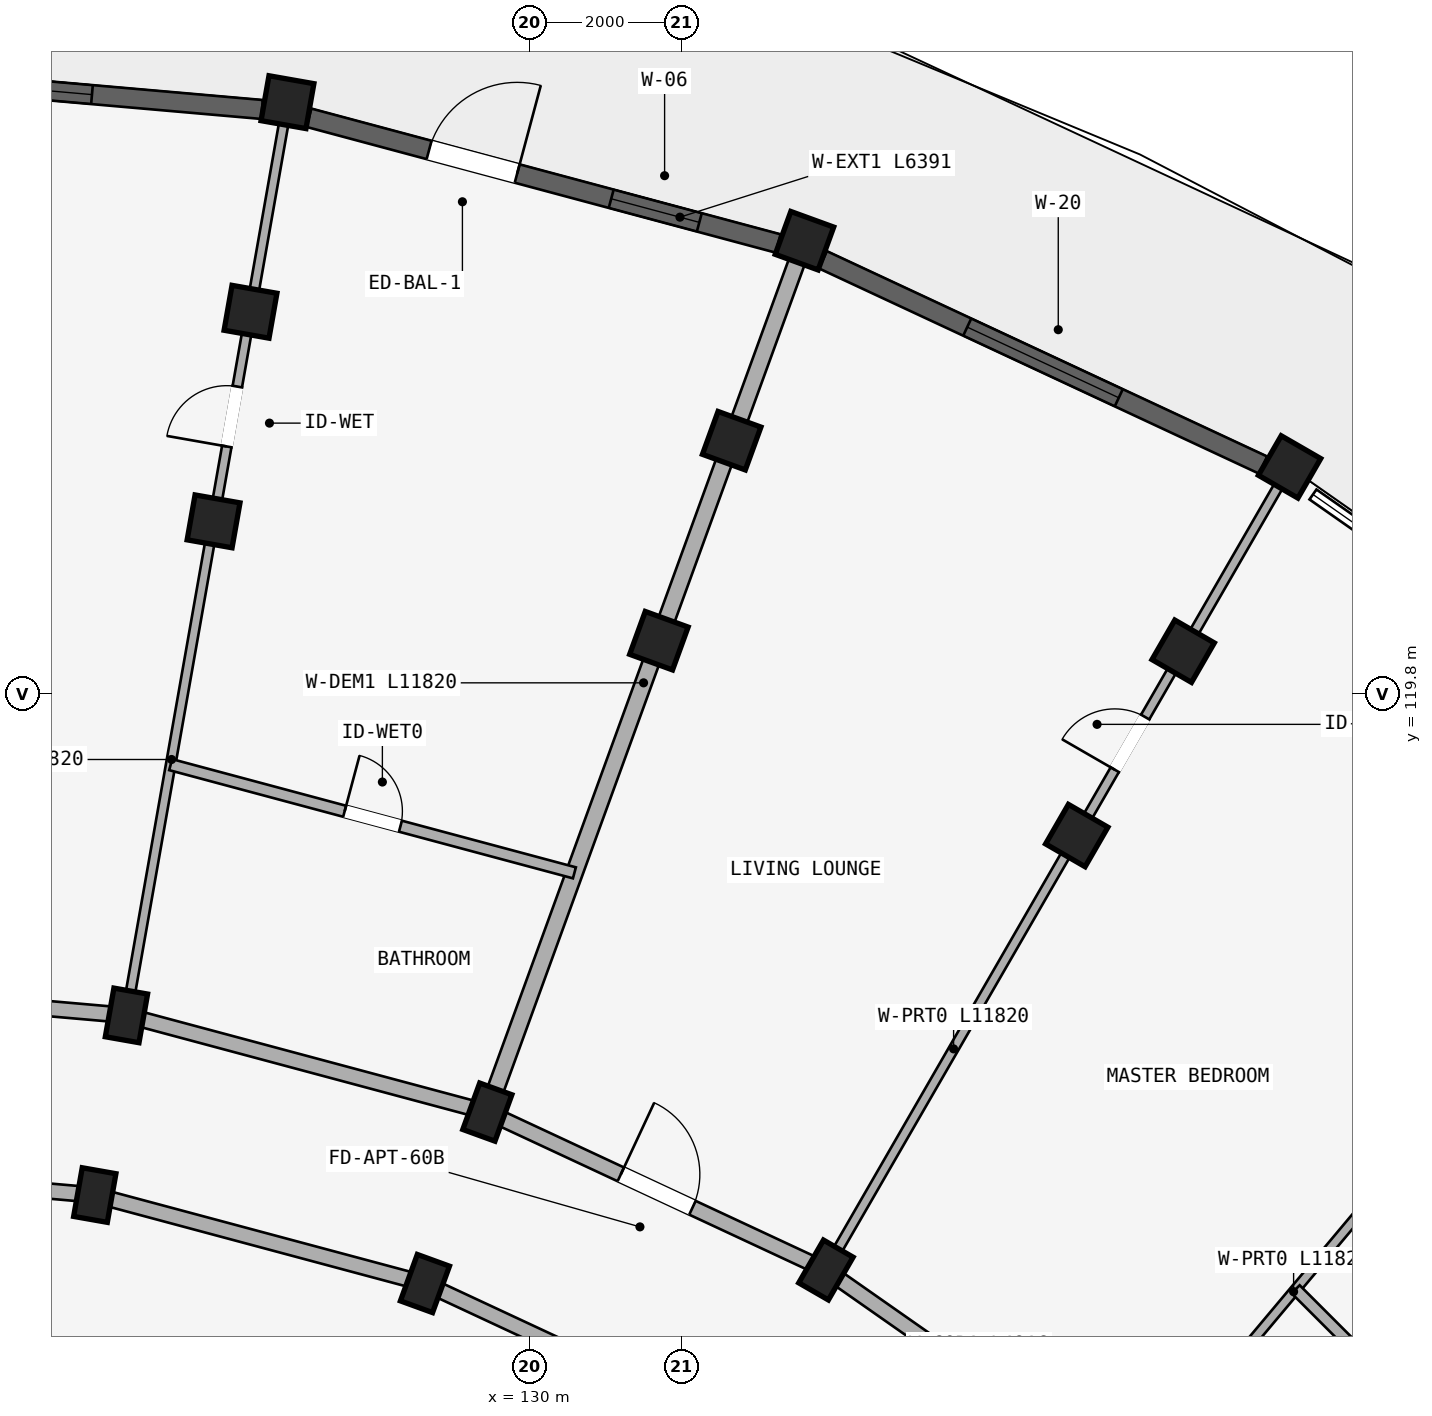
"""IFC4 building model, lengths in metres.
Left out: names, types, materials, properties, quantities, classifications, styles, units other than length and angle.
Written with IfcOpenShell. Run it as: python <this file> out.ifc"""

import sys

from ifc_helpers import new_model, si_unit, direction, frame, frame_2d, origin, origin_2d, place, context, subcontext, project, spatial, rectangle, extrude, element, fill, save


model = new_model("IFC4")
c1 = context("Model", 3, precision=1e-05, world=origin(), true_north=direction((0.0, 1.0)))
c2 = subcontext(c1, "Body", "Model", "MODEL_VIEW")
j1 = project(units=[si_unit("LENGTHUNIT", "METRE"), si_unit("PLANEANGLEUNIT", "RADIAN")], contexts=[c1])
p1 = place(None, origin())
s1 = spatial("IfcSite", under=j1, at=p1, CompositionType="ELEMENT")
p2 = place(p1, origin())
s2 = spatial("IfcBuilding", under=s1, at=p2, CompositionType="ELEMENT")
p3 = place(p2, frame((0.0, 0.0, 33.9)))
s3 = spatial("IfcBuildingStorey", under=s2, at=p3, CompositionType="ELEMENT", Elevation=33.9)
for number, where, z_axis, x_axis in (
    (1, (124.28, 113.208, 0.0), (0.0, 0.0, 1.0), (-0.985, 0.174, 0.0)),
    (2, (124.697, 115.572, 0.0), (0.0, 0.0, 1.0), (-0.985, 0.174, 0.0)),
):
    element("IfcColumn", number, at=place(p3, frame(where, z_axis=z_axis, x_axis=x_axis)), inside=s3, PredefinedType="COLUMN", context=c2, shape_type="SweptSolid", body=[
        extrude(rectangle(XDim=0.45, YDim=0.65, at=origin_2d()), origin(), (0.0, 0.0, 1.0), 2.93),
    ])
for number, where, z_axis, x_axis in (
    (3, (125.843, 122.071, 0.0), (0.0, 0.0, 1.0), (-0.985, 0.174, 0.0)),
    (4, (126.329, 124.829, 0.0), (0.0, 0.0, 1.0), (-0.985, 0.174, 0.0)),
):
    element("IfcColumn", number, at=place(p3, frame(where, z_axis=z_axis, x_axis=x_axis)), inside=s3, PredefinedType="COLUMN", context=c2, shape_type="SweptSolid", body=[
        extrude(rectangle(XDim=0.6, YDim=0.6, at=origin_2d()), origin(), (0.0, 0.0, 1.0), 2.93),
    ])
p4 = place(p3, frame((126.815, 127.586, 0.0), z_axis=(0.0, 0.0, 1.0), x_axis=(-0.984807753012, 0.173648177667, 0.0)))
e5 = element("IfcColumn", 5, at=p4, inside=s3, PredefinedType="COLUMN", context=c2, shape_type="SweptSolid", body=[
    extrude(rectangle(XDim=0.6, YDim=0.6, at=origin_2d()), origin(), (0.0, 0.0, 1.0), 2.97),
])
for number, where, z_axis, x_axis in (
    (6, (128.624, 112.044, 0.0), (0.0, 0.0, 1.0), (-0.94, 0.342, 0.0)),
    (7, (129.445, 114.299, 0.0), (0.0, 0.0, 1.0), (-0.94, 0.342, 0.0)),
):
    element("IfcColumn", number, at=place(p3, frame(where, z_axis=z_axis, x_axis=x_axis)), inside=s3, PredefinedType="COLUMN", context=c2, shape_type="SweptSolid", body=[
        extrude(rectangle(XDim=0.45, YDim=0.65, at=origin_2d()), origin(), (0.0, 0.0, 1.0), 2.93),
    ])
for number, where, z_axis, x_axis in (
    (8, (131.702, 120.501, 0.0), (0.0, 0.0, 1.0), (-0.94, 0.342, 0.0)),
    (9, (132.66, 123.132, 0.0), (0.0, 0.0, 1.0), (-0.94, 0.342, 0.0)),
):
    element("IfcColumn", number, at=place(p3, frame(where, z_axis=z_axis, x_axis=x_axis)), inside=s3, PredefinedType="COLUMN", context=c2, shape_type="SweptSolid", body=[
        extrude(rectangle(XDim=0.6, YDim=0.6, at=origin_2d()), origin(), (0.0, 0.0, 1.0), 2.93),
    ])
p5 = place(p3, frame((133.618, 125.764, 0.0), z_axis=(0.0, 0.0, 1.0), x_axis=(-0.939692620786, 0.342020143326, 0.0)))
e10 = element("IfcColumn", 10, at=p5, inside=s3, PredefinedType="COLUMN", context=c2, shape_type="SweptSolid", body=[
    extrude(rectangle(XDim=0.6, YDim=0.6, at=origin_2d()), origin(), (0.0, 0.0, 1.0), 2.97),
])
p6 = place(p3, frame((133.9, 112.222, 0.0), z_axis=(0.0, 0.0, 1.0), x_axis=(-0.866025403784, 0.5, 0.0)))
e11 = element("IfcColumn", 11, at=p6, inside=s3, PredefinedType="COLUMN", context=c2, shape_type="SweptSolid", body=[
    extrude(rectangle(XDim=0.45, YDim=0.65, at=origin_2d()), origin(), (0.0, 0.0, 1.0), 2.93),
])
for number, where, z_axis, x_axis in (
    (12, (137.2, 117.938, 0.0), (0.0, 0.0, 1.0), (-0.866, 0.5, 0.0)),
    (13, (138.6, 120.363, 0.0), (0.0, 0.0, 1.0), (-0.866, 0.5, 0.0)),
):
    element("IfcColumn", number, at=place(p3, frame(where, z_axis=z_axis, x_axis=x_axis)), inside=s3, PredefinedType="COLUMN", context=c2, shape_type="SweptSolid", body=[
        extrude(rectangle(XDim=0.6, YDim=0.6, at=origin_2d()), origin(), (0.0, 0.0, 1.0), 2.93),
    ])
p7 = place(p3, frame((140.0, 122.787, 0.0), z_axis=(0.0, 0.0, 1.0), x_axis=(-0.866025403784, 0.5, 0.0)))
e14 = element("IfcColumn", 14, at=p7, inside=s3, PredefinedType="COLUMN", context=c2, shape_type="SweptSolid", body=[
    extrude(rectangle(XDim=0.6, YDim=0.6, at=origin_2d()), origin(), (0.0, 0.0, 1.0), 2.97),
])
p8 = place(p3, frame((119.8, 113.6, 0.0), z_axis=(0.0, 0.0, 1.0), x_axis=(0.996191949488, -0.087187153726, 0.0)))
e15 = element("IfcWall", 15, at=p8, inside=s3, PredefinedType="STANDARD", context=c2, shape_type="SweptSolid", body=[
    extrude(rectangle(XDim=4.497, YDim=0.2, at=frame_2d((2.249, 0.0))), origin(), (0.0, 0.0, 1.0), 2.372),
])
p9 = place(p8, frame((1.729, 0.0, 0.0)))
e16 = element("IfcOpeningElement", 16, at=p9, cuts=e15, PredefinedType="OPENING", context=c2, shape_type="SweptSolid", body=[
    extrude(rectangle(XDim=1.04, YDim=2.15, at=frame_2d((0.52, 1.075))), frame((0.0, 0.11, 0.0), z_axis=(0.0, -1.0, 0.0), x_axis=(1.0, 0.0, 0.0)), (0.0, 0.0, 1.0), 0.22),
])
p10 = place(p3, frame((119.8, 116.0, 0.0), z_axis=(0.0, 0.0, 1.0), x_axis=(0.996193663584, -0.087167566415, 0.0)))
e17 = element("IfcWall", 17, at=p10, inside=s3, PredefinedType="STANDARD", context=c2, shape_type="SweptSolid", body=[
    extrude(rectangle(XDim=4.916, YDim=0.2, at=frame_2d((2.458, 0.0))), origin(), (0.0, 0.0, 1.0), 2.372),
])
p11 = place(p10, frame((1.958, 0.0, 0.0)))
e18 = element("IfcOpeningElement", 18, at=p11, cuts=e17, PredefinedType="OPENING", context=c2, shape_type="SweptSolid", body=[
    extrude(rectangle(XDim=1.0, YDim=2.15, at=frame_2d((0.5, 1.075))), frame((0.0, 0.11, 0.0), z_axis=(0.0, -1.0, 0.0), x_axis=(1.0, 0.0, 0.0)), (0.0, 0.0, 1.0), 0.22),
])
p12 = place(p3, frame((124.28, 113.208, 0.0), z_axis=(0.0, 0.0, 1.0), x_axis=(0.965934240054, -0.258787642463, 0.0)))
e19 = element("IfcWall", 19, at=p12, inside=s3, PredefinedType="STANDARD", context=c2, shape_type="SweptSolid", body=[
    extrude(rectangle(XDim=4.497, YDim=0.2, at=frame_2d((2.249, 0.0))), origin(), (0.0, 0.0, 1.0), 2.372),
])
p13 = place(p3, frame((124.697, 115.572, 0.0), z_axis=(0.0, 0.0, 1.0), x_axis=(0.965930095386, -0.258803112091, 0.0)))
e20 = element("IfcWall", 20, at=p13, inside=s3, PredefinedType="STANDARD", context=c2, shape_type="SweptSolid", body=[
    extrude(rectangle(XDim=4.916, YDim=0.2, at=frame_2d((2.458, 0.0))), origin(), (0.0, 0.0, 1.0), 2.372),
])
p14 = place(p3, frame((128.624, 112.044, 0.0), z_axis=(0.0, 0.0, 1.0), x_axis=(0.906307919131, -0.422617978463, 0.0)))
e21 = element("IfcWall", 21, at=p14, inside=s3, PredefinedType="STANDARD", context=c2, shape_type="SweptSolid", body=[
    extrude(rectangle(XDim=4.497, YDim=0.2, at=frame_2d((2.249, 0.0))), origin(), (0.0, 0.0, 1.0), 2.372),
])
p15 = place(p3, frame((129.445, 114.299, 0.0), z_axis=(0.0, 0.0, 1.0), x_axis=(0.906302381024, -0.422629854778, 0.0)))
e22 = element("IfcWall", 22, at=p15, inside=s3, PredefinedType="STANDARD", context=c2, shape_type="SweptSolid", body=[
    extrude(rectangle(XDim=4.915, YDim=0.2, at=frame_2d((2.458, 0.0))), origin(), (0.0, 0.0, 1.0), 2.372),
])
p16 = place(p15, frame((1.938, 0.0, 0.0)))
e23 = element("IfcOpeningElement", 23, at=p16, cuts=e22, PredefinedType="OPENING", context=c2, shape_type="SweptSolid", body=[
    extrude(rectangle(XDim=1.04, YDim=2.15, at=frame_2d((0.52, 1.075))), frame((0.0, 0.11, 0.0), z_axis=(0.0, -1.0, 0.0), x_axis=(1.0, 0.0, 0.0)), (0.0, 0.0, 1.0), 0.22),
])
p17 = place(p3, frame((133.9, 112.222, 0.0), z_axis=(0.0, 0.0, 1.0), x_axis=(0.819140911474, -0.573592335331, 0.0)))
e24 = element("IfcWall", 24, at=p17, inside=s3, PredefinedType="STANDARD", context=c2, shape_type="SweptSolid", body=[
    extrude(rectangle(XDim=4.916, YDim=0.2, at=frame_2d((2.458, 0.0))), origin(), (0.0, 0.0, 1.0), 2.372),
])
p18 = place(p3, frame((124.714, 115.67, 0.0), z_axis=(0.0, 0.0, 1.0), x_axis=(0.173646292378, 0.984808085438, 0.0)))
e25 = element("IfcWall", 25, at=p18, inside=s3, PredefinedType="PARTITIONING", context=c2, shape_type="SweptSolid", body=[
    extrude(rectangle(XDim=11.82, YDim=0.125, at=frame_2d((5.91, 0.0))), origin(), (0.0, 0.0, 1.0), 2.372),
])
p19 = place(p18, frame((7.5, 0.0, 0.0)))
e26 = element("IfcOpeningElement", 26, at=p19, cuts=e25, PredefinedType="OPENING", context=c2, shape_type="SweptSolid", body=[
    extrude(rectangle(XDim=0.8, YDim=2.1, at=frame_2d((0.4, 1.05))), frame((0.0, 0.073, 0.0), z_axis=(0.0, -1.0, 0.0), x_axis=(1.0, 0.0, 0.0)), (0.0, 0.0, 1.0), 0.145),
])
p20 = place(p3, frame((129.479, 114.393, 0.0), z_axis=(0.0, 0.0, 1.0), x_axis=(0.342005081534, 0.939698102693, 0.0)))
e27 = element("IfcWall", 27, at=p20, inside=s3, PredefinedType="STANDARD", context=c2, shape_type="SweptSolid", body=[
    extrude(rectangle(XDim=11.82, YDim=0.22, at=frame_2d((5.91, 0.0))), origin(), (0.0, 0.0, 1.0), 2.372),
])
p21 = place(p3, frame((133.95, 112.309, 0.0), z_axis=(0.0, 0.0, 1.0), x_axis=(0.500013290014, 0.866017730655, 0.0)))
e28 = element("IfcWall", 28, at=p21, inside=s3, PredefinedType="PARTITIONING", context=c2, shape_type="SweptSolid", body=[
    extrude(rectangle(XDim=11.82, YDim=0.125, at=frame_2d((5.91, 0.0))), origin(), (0.0, 0.0, 1.0), 2.372),
])
p22 = place(p21, frame((7.5, 0.0, 0.0)))
e29 = element("IfcOpeningElement", 29, at=p22, cuts=e28, PredefinedType="OPENING", context=c2, shape_type="SweptSolid", body=[
    extrude(rectangle(XDim=0.8, YDim=2.1, at=frame_2d((0.4, 1.05))), frame((0.0, 0.073, 0.0), z_axis=(0.0, -1.0, 0.0), x_axis=(1.0, 0.0, 0.0)), (0.0, 0.0, 1.0), 0.145),
])
p23 = place(p3, frame((137.991, 109.479, 0.0), z_axis=(0.0, 0.0, 1.0), x_axis=(0.642781220531, 0.766049804211, 0.0)))
e30 = element("IfcWall", 30, at=p23, inside=s3, PredefinedType="PARTITIONING", context=c2, shape_type="SweptSolid", body=[
    extrude(rectangle(XDim=11.82, YDim=0.125, at=frame_2d((5.91, 0.0))), origin(), (0.0, 0.0, 1.0), 2.372),
])
p24 = place(p23, frame((7.5, 0.0, 0.0)))
e31 = element("IfcOpeningElement", 31, at=p24, cuts=e30, PredefinedType="OPENING", context=c2, shape_type="SweptSolid", body=[
    extrude(rectangle(XDim=0.8, YDim=2.1, at=frame_2d((0.4, 1.05))), frame((0.0, 0.073, 0.0), z_axis=(0.0, -1.0, 0.0), x_axis=(1.0, 0.0, 0.0)), (0.0, 0.0, 1.0), 0.145),
])
p25 = place(p3, frame((125.279, 118.871, 0.0), z_axis=(0.0, 0.0, 1.0), x_axis=(0.965929227513, -0.258806351229, 0.0)))
e32 = element("IfcWall", 32, at=p25, inside=s3, PredefinedType="PLUMBINGWALL", context=c2, shape_type="SweptSolid", body=[
    extrude(rectangle(XDim=5.5, YDim=0.15, at=frame_2d((2.75, 0.0))), origin(), (0.0, 0.0, 1.0), 2.372),
])
p26 = place(p25, frame((2.37, 0.0, 0.0)))
e33 = element("IfcOpeningElement", 33, at=p26, cuts=e32, PredefinedType="OPENING", context=c2, shape_type="SweptSolid", body=[
    extrude(rectangle(XDim=0.76, YDim=2.05, at=frame_2d((0.38, 1.025))), frame((0.0, 0.085, 0.0), z_axis=(0.0, -1.0, 0.0), x_axis=(1.0, 0.0, 0.0)), (0.0, 0.0, 1.0), 0.17),
])
p27 = place(p3, frame((140.08, 111.969, 0.0), z_axis=(0.0, 0.0, 1.0), x_axis=(0.707106781187, -0.707106781187, 0.0)))
e34 = element("IfcWall", 34, at=p27, inside=s3, PredefinedType="PLUMBINGWALL", context=c2, shape_type="SweptSolid", body=[
    extrude(rectangle(XDim=5.5, YDim=0.15, at=frame_2d((2.75, 0.0))), origin(), (0.0, 0.0, 1.0), 2.372),
])
p28 = place(p27, frame((2.37, 0.0, 0.0)))
e35 = element("IfcOpeningElement", 35, at=p28, cuts=e34, PredefinedType="OPENING", context=c2, shape_type="SweptSolid", body=[
    extrude(rectangle(XDim=0.76, YDim=2.05, at=frame_2d((0.38, 1.025))), frame((0.0, 0.085, 0.0), z_axis=(0.0, -1.0, 0.0), x_axis=(1.0, 0.0, 0.0)), (0.0, 0.0, 1.0), 0.17),
])
p29 = place(p3, frame((120.114, 128.047, 0.0), z_axis=(0.0, 0.0, 1.0), x_axis=(0.996192846662, -0.087176902101, 0.0)))
e36 = element("IfcWall", 36, at=p29, inside=s3, PredefinedType="STANDARD", context=c2, shape_type="SweptSolid", body=[
    extrude(rectangle(XDim=6.391, YDim=0.25, at=frame_2d((3.195, 0.0))), origin(), (0.0, 0.0, 1.0), 2.48),
])
p30 = place(p29, frame((2.245, 0.0, 0.53)))
e37 = element("IfcOpeningElement", 37, at=p30, cuts=e36, PredefinedType="OPENING", context=c2, shape_type="SweptSolid", body=[
    extrude(rectangle(XDim=1.9, YDim=1.75, at=frame_2d((0.95, 0.875))), frame((0.0, 0.135, 0.0), z_axis=(0.0, -1.0, 0.0), x_axis=(1.0, 0.0, 0.0)), (0.0, 0.0, 1.0), 0.27),
])
p31 = place(p3, frame((127.098, 127.381, 0.0), z_axis=(0.0, 0.0, 1.0), x_axis=(0.965926736728, -0.258815647274, 0.0)))
e38 = element("IfcWall", 38, at=p31, inside=s3, PredefinedType="STANDARD", context=c2, shape_type="SweptSolid", body=[
    extrude(rectangle(XDim=6.391, YDim=0.25, at=frame_2d((3.195, 0.0))), origin(), (0.0, 0.0, 1.0), 2.48),
])
p32 = place(p31, frame((4.118, 0.0, 0.63)))
e39 = element("IfcOpeningElement", 39, at=p32, cuts=e38, PredefinedType="OPENING", context=c2, shape_type="SweptSolid", body=[
    extrude(rectangle(XDim=1.2, YDim=1.5, at=frame_2d((0.6, 0.75))), frame((0.0, 0.135, 0.0), z_axis=(0.0, -1.0, 0.0), x_axis=(1.0, 0.0, 0.0)), (0.0, 0.0, 1.0), 0.27),
])
p33 = place(p31, frame((1.637, 0.0, 0.0)))
e40 = element("IfcOpeningElement", 40, at=p33, cuts=e38, PredefinedType="OPENING", context=c2, shape_type="SweptSolid", body=[
    extrude(rectangle(XDim=1.2, YDim=2.15, at=frame_2d((0.6, 1.075))), frame((0.0, 0.135, 0.0), z_axis=(0.0, -1.0, 0.0), x_axis=(1.0, 0.0, 0.0)), (0.0, 0.0, 1.0), 0.27),
])
p34 = place(p3, frame((133.86, 125.513, 0.0), z_axis=(0.0, 0.0, 1.0), x_axis=(0.906309969922, -0.422613580495, 0.0)))
e41 = element("IfcWall", 41, at=p34, inside=s3, PredefinedType="STANDARD", context=c2, shape_type="SweptSolid", body=[
    extrude(rectangle(XDim=6.391, YDim=0.25, at=frame_2d((3.196, 0.0))), origin(), (0.0, 0.0, 1.0), 2.48),
])
p35 = place(p34, frame((2.095, 0.0, 0.38)))
e42 = element("IfcOpeningElement", 42, at=p35, cuts=e41, PredefinedType="OPENING", context=c2, shape_type="SweptSolid", body=[
    extrude(rectangle(XDim=2.2, YDim=1.9, at=frame_2d((1.1, 0.95))), frame((0.0, 0.135, 0.0), z_axis=(0.0, -1.0, 0.0), x_axis=(1.0, 0.0, 0.0)), (0.0, 0.0, 1.0), 0.27),
])
p36 = place(p30, origin())
e43 = element("IfcWindow", 43, at=p36, inside=s3, PartitioningType="DOUBLE_PANEL_VERTICAL", PredefinedType="WINDOW", context=c2, shape_type="SweptSolid", body=[
    extrude(rectangle(XDim=1.9, YDim=1.75, at=frame_2d((0.95, 0.875))), frame((0.0, 0.03, 0.0), z_axis=(0.0, -1.0, 0.0), x_axis=(1.0, 0.0, 0.0)), (0.0, 0.0, 1.0), 0.06),
])
fill(e37, e43)
p37 = place(p32, origin())
e44 = element("IfcWindow", 44, at=p37, inside=s3, PartitioningType="SINGLE_PANEL", PredefinedType="WINDOW", context=c2, shape_type="SweptSolid", body=[
    extrude(rectangle(XDim=1.2, YDim=1.5, at=frame_2d((0.6, 0.75))), frame((0.0, 0.03, 0.0), z_axis=(0.0, -1.0, 0.0), x_axis=(1.0, 0.0, 0.0)), (0.0, 0.0, 1.0), 0.06),
])
fill(e39, e44)
p38 = place(p35, origin())
e45 = element("IfcWindow", 45, at=p38, inside=s3, PartitioningType="TRIPLE_PANEL_VERTICAL", PredefinedType="WINDOW", context=c2, shape_type="SweptSolid", body=[
    extrude(rectangle(XDim=2.2, YDim=1.9, at=frame_2d((1.1, 0.95))), frame((0.0, 0.03, 0.0), z_axis=(0.0, -1.0, 0.0), x_axis=(1.0, 0.0, 0.0)), (0.0, 0.0, 1.0), 0.06),
])
fill(e42, e45)
p39 = place(p19, origin())
e46 = element("IfcDoor", 46, at=p39, inside=s3, OperationType="SINGLE_SWING_LEFT", PredefinedType="DOOR", context=c2, shape_type="SweptSolid", body=[
    extrude(rectangle(XDim=0.8, YDim=2.1, at=frame_2d((0.4, 1.05))), frame((0.0, 0.025, 0.0), z_axis=(0.0, -1.0, 0.0), x_axis=(1.0, 0.0, 0.0)), (0.0, 0.0, 1.0), 0.05),
])
fill(e26, e46)
p40 = place(p22, frame((0.8, 0.0, 0.0), z_axis=(0.0, 0.0, 1.0), x_axis=(-1.0, 0.0, 0.0)))
e47 = element("IfcDoor", 47, at=p40, inside=s3, OperationType="SINGLE_SWING_RIGHT", PredefinedType="DOOR", context=c2, shape_type="SweptSolid", body=[
    extrude(rectangle(XDim=0.8, YDim=2.1, at=frame_2d((0.4, 1.05))), frame((0.0, 0.025, 0.0), z_axis=(0.0, -1.0, 0.0), x_axis=(1.0, 0.0, 0.0)), (0.0, 0.0, 1.0), 0.05),
])
fill(e29, e47)
p41 = place(p26, frame((0.76, 0.0, 0.0), z_axis=(0.0, 0.0, 1.0), x_axis=(-1.0, 0.0, 0.0)))
e48 = element("IfcDoor", 48, at=p41, inside=s3, OperationType="SINGLE_SWING_RIGHT", PredefinedType="DOOR", context=c2, shape_type="SweptSolid", body=[
    extrude(rectangle(XDim=0.76, YDim=2.05, at=frame_2d((0.38, 1.025))), frame((0.0, 0.025, 0.0), z_axis=(0.0, -1.0, 0.0), x_axis=(1.0, 0.0, 0.0)), (0.0, 0.0, 1.0), 0.05),
])
fill(e33, e48)
p42 = place(p16, origin())
e49 = element("IfcDoor", 49, at=p42, inside=s3, OperationType="SINGLE_SWING_LEFT", PredefinedType="DOOR", context=c2, shape_type="SweptSolid", body=[
    extrude(rectangle(XDim=1.04, YDim=2.15, at=frame_2d((0.52, 1.075))), frame((0.0, 0.025, 0.0), z_axis=(0.0, -1.0, 0.0), x_axis=(1.0, 0.0, 0.0)), (0.0, 0.0, 1.0), 0.05),
])
fill(e23, e49)
p43 = place(p33, origin())
e50 = element("IfcDoor", 50, at=p43, inside=s3, OperationType="SINGLE_SWING_RIGHT", PredefinedType="DOOR", context=c2, shape_type="SweptSolid", body=[
    extrude(rectangle(XDim=1.2, YDim=2.15, at=frame_2d((0.6, 1.075))), frame((0.0, 0.025, 0.0), z_axis=(0.0, -1.0, 0.0), x_axis=(1.0, 0.0, 0.0)), (0.0, 0.0, 1.0), 0.05),
])
fill(e40, e50)
save(model, sys.argv[1])
